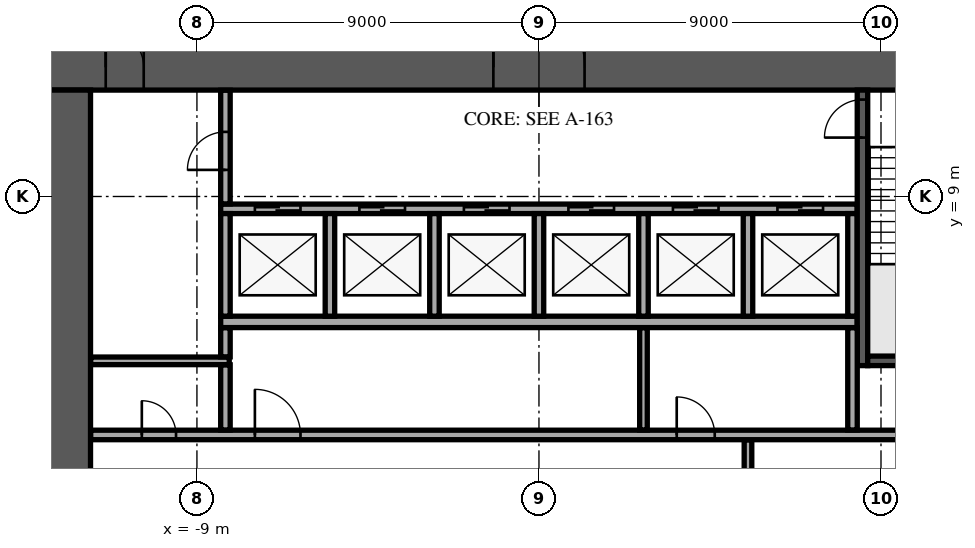
"""IFC4 building model, lengths in metres.
Left out: names, types, materials, properties, quantities, classifications, styles, units other than length and angle.
Written with IfcOpenShell. Run it as: python <this file> out.ifc"""

import sys

from ifc_helpers import new_model, si_unit, direction, frame, frame_2d, origin, place, context, subcontext, project, spatial, rectangle, extrude, element, fill, save


model = new_model("IFC4")
c1 = context("Model", 3, precision=1e-05, world=origin(), true_north=direction((0.0, 1.0)))
c2 = subcontext(c1, "Body", "Model", "MODEL_VIEW")
j1 = project(units=[si_unit("LENGTHUNIT", "METRE"), si_unit("PLANEANGLEUNIT", "RADIAN")], contexts=[c1])
p1 = place(None, origin())
s1 = spatial("IfcSite", under=j1, at=p1, CompositionType="ELEMENT")
p2 = place(p1, origin())
s2 = spatial("IfcBuilding", under=s1, at=p2, CompositionType="ELEMENT")
p3 = place(p2, origin())
s3 = spatial("IfcBuildingStorey", under=s2, at=p3, CompositionType="ELEMENT", Elevation=0.0)
p4 = place(p3, frame((-13.0, 12.4, 0.0), z_axis=(0.0, 0.0, 1.0), x_axis=(1.0, 0.0, 0.0)))
e1 = element("IfcWall", 1, at=p4, inside=s3, PredefinedType="SHEAR", context=c2, shape_type="SweptSolid", body=[
    extrude(rectangle(XDim=26.0, YDim=1.2, at=frame_2d((13.0, 0.0))), origin(), (0.0, 0.0, 1.0), 4.1),
])
p5 = place(p4, frame((11.8, 0.0, 0.0)))
e2 = element("IfcOpeningElement", 2, at=p5, cuts=e1, PredefinedType="OPENING", context=c2, shape_type="SweptSolid", body=[
    extrude(rectangle(XDim=2.4, YDim=2.4, at=frame_2d((1.2, 1.2))), frame((0.0, 0.61, 0.0), z_axis=(0.0, -1.0, 0.0), x_axis=(1.0, 0.0, 0.0)), (0.0, 0.0, 1.0), 1.22),
])
p6 = place(p4, frame((22.625, 0.0, 0.0)))
e3 = element("IfcOpeningElement", 3, at=p6, cuts=e1, PredefinedType="OPENING", context=c2, shape_type="SweptSolid", body=[
    extrude(rectangle(XDim=1.2, YDim=2.1, at=frame_2d((0.6, 1.05))), frame((0.0, 0.61, 0.0), z_axis=(0.0, -1.0, 0.0), x_axis=(1.0, 0.0, 0.0)), (0.0, 0.0, 1.0), 1.22),
])
p7 = place(p4, frame((1.6, 0.0, 0.0)))
e4 = element("IfcOpeningElement", 4, at=p7, cuts=e1, PredefinedType="OPENING", context=c2, shape_type="SweptSolid", body=[
    extrude(rectangle(XDim=1.0, YDim=2.1, at=frame_2d((0.5, 1.05))), frame((0.0, 0.61, 0.0), z_axis=(0.0, -1.0, 0.0), x_axis=(1.0, 0.0, 0.0)), (0.0, 0.0, 1.0), 1.22),
])
p8 = place(p3, frame((-12.4, -11.8, 0.0), z_axis=(0.0, 0.0, 1.0), x_axis=(0.0, 1.0, 0.0)))
e5 = element("IfcWall", 5, at=p8, inside=s3, PredefinedType="SHEAR", context=c2, shape_type="SweptSolid", body=[
    extrude(rectangle(XDim=23.6, YDim=1.2, at=frame_2d((11.8, 0.0))), origin(), (0.0, 0.0, 1.0), 4.1),
])
p9 = place(p8, frame((10.6, 0.0, 0.0)))
e6 = element("IfcOpeningElement", 6, at=p9, cuts=e5, PredefinedType="OPENING", context=c2, shape_type="SweptSolid", body=[
    extrude(rectangle(XDim=2.4, YDim=2.4, at=frame_2d((1.2, 1.2))), frame((0.0, 0.61, 0.0), z_axis=(0.0, -1.0, 0.0), x_axis=(1.0, 0.0, 0.0)), (0.0, 0.0, 1.0), 1.22),
])
p10 = place(p3, frame((-8.375, 5.7, 0.0), z_axis=(0.0, 0.0, 1.0), x_axis=(1.0, 0.0, 0.0)))
e7 = element("IfcWall", 7, at=p10, inside=s3, PredefinedType="SOLIDWALL", context=c2, shape_type="SweptSolid", body=[
    extrude(rectangle(XDim=16.75, YDim=0.3, at=frame_2d((8.375, 0.0))), origin(), (0.0, 0.0, 1.0), 4.1),
])
p11 = place(p3, frame((-8.375, 8.675, 0.0), z_axis=(0.0, 0.0, 1.0), x_axis=(1.0, 0.0, 0.0)))
e8 = element("IfcWall", 8, at=p11, inside=s3, PredefinedType="SOLIDWALL", context=c2, shape_type="SweptSolid", body=[
    extrude(rectangle(XDim=16.75, YDim=0.25, at=frame_2d((8.375, 0.0))), origin(), (0.0, 0.0, 1.0), 4.1),
])
p12 = place(p11, frame((0.9, 0.0, 0.0)))
e9 = element("IfcOpeningElement", 9, at=p12, cuts=e8, PredefinedType="OPENING", context=c2, shape_type="SweptSolid", body=[
    extrude(rectangle(XDim=1.2, YDim=2.1, at=frame_2d((0.6, 1.05))), frame((0.0, 0.135, 0.0), z_axis=(0.0, -1.0, 0.0), x_axis=(1.0, 0.0, 0.0)), (0.0, 0.0, 1.0), 0.27),
])
p13 = place(p11, frame((3.65, 0.0, 0.0)))
e10 = element("IfcOpeningElement", 10, at=p13, cuts=e8, PredefinedType="OPENING", context=c2, shape_type="SweptSolid", body=[
    extrude(rectangle(XDim=1.2, YDim=2.1, at=frame_2d((0.6, 1.05))), frame((0.0, 0.135, 0.0), z_axis=(0.0, -1.0, 0.0), x_axis=(1.0, 0.0, 0.0)), (0.0, 0.0, 1.0), 0.27),
])
p14 = place(p11, frame((6.4, 0.0, 0.0)))
e11 = element("IfcOpeningElement", 11, at=p14, cuts=e8, PredefinedType="OPENING", context=c2, shape_type="SweptSolid", body=[
    extrude(rectangle(XDim=1.2, YDim=2.1, at=frame_2d((0.6, 1.05))), frame((0.0, 0.135, 0.0), z_axis=(0.0, -1.0, 0.0), x_axis=(1.0, 0.0, 0.0)), (0.0, 0.0, 1.0), 0.27),
])
p15 = place(p11, frame((9.15, 0.0, 0.0)))
e12 = element("IfcOpeningElement", 12, at=p15, cuts=e8, PredefinedType="OPENING", context=c2, shape_type="SweptSolid", body=[
    extrude(rectangle(XDim=1.2, YDim=2.1, at=frame_2d((0.6, 1.05))), frame((0.0, 0.135, 0.0), z_axis=(0.0, -1.0, 0.0), x_axis=(1.0, 0.0, 0.0)), (0.0, 0.0, 1.0), 0.27),
])
p16 = place(p11, frame((11.9, 0.0, 0.0)))
e13 = element("IfcOpeningElement", 13, at=p16, cuts=e8, PredefinedType="OPENING", context=c2, shape_type="SweptSolid", body=[
    extrude(rectangle(XDim=1.2, YDim=2.1, at=frame_2d((0.6, 1.05))), frame((0.0, 0.135, 0.0), z_axis=(0.0, -1.0, 0.0), x_axis=(1.0, 0.0, 0.0)), (0.0, 0.0, 1.0), 0.27),
])
p17 = place(p11, frame((14.65, 0.0, 0.0)))
e14 = element("IfcOpeningElement", 14, at=p17, cuts=e8, PredefinedType="OPENING", context=c2, shape_type="SweptSolid", body=[
    extrude(rectangle(XDim=1.2, YDim=2.1, at=frame_2d((0.6, 1.05))), frame((0.0, 0.135, 0.0), z_axis=(0.0, -1.0, 0.0), x_axis=(1.0, 0.0, 0.0)), (0.0, 0.0, 1.0), 0.27),
])
for number, where, z_axis, x_axis in (
    (15, (-8.25, 5.85, 0.0), (0.0, 0.0, 1.0), (0.0, 1.0, 0.0)),
    (16, (-5.5, 5.85, 0.0), (0.0, 0.0, 1.0), (0.0, 1.0, 0.0)),
    (17, (-2.75, 5.85, 0.0), (0.0, 0.0, 1.0), (0.0, 1.0, 0.0)),
    (18, (0.0, 5.85, 0.0), (0.0, 0.0, 1.0), (0.0, 1.0, 0.0)),
    (19, (2.75, 5.85, 0.0), (0.0, 0.0, 1.0), (0.0, 1.0, 0.0)),
    (20, (5.5, 5.85, 0.0), (0.0, 0.0, 1.0), (0.0, 1.0, 0.0)),
    (21, (8.25, 5.85, 0.0), (0.0, 0.0, 1.0), (0.0, 1.0, 0.0)),
):
    element("IfcWall", number, at=place(p3, frame(where, z_axis=z_axis, x_axis=x_axis)), inside=s3, PredefinedType="SOLIDWALL", context=c2, shape_type="SweptSolid", body=[
        extrude(rectangle(XDim=2.7, YDim=0.25, at=frame_2d((1.35, 0.0))), origin(), (0.0, 0.0, 1.0), 4.1),
    ])
p18 = place(p3, frame((8.512, 4.55, 0.0), z_axis=(0.0, 0.0, 1.0), x_axis=(0.0, 1.0, 0.0)))
e22 = element("IfcWall", 22, at=p18, inside=s3, PredefinedType="SOLIDWALL", context=c2, shape_type="SweptSolid", body=[
    extrude(rectangle(XDim=7.25, YDim=0.275, at=frame_2d((3.625, 0.0))), origin(), (0.0, 0.0, 1.0), 4.1),
])
p19 = place(p18, frame((6.0, 0.0, 0.0)))
e23 = element("IfcOpeningElement", 23, at=p19, cuts=e22, PredefinedType="OPENING", context=c2, shape_type="SweptSolid", body=[
    extrude(rectangle(XDim=1.0, YDim=2.1, at=frame_2d((0.5, 1.05))), frame((0.0, 0.147, 0.0), z_axis=(0.0, -1.0, 0.0), x_axis=(1.0, 0.0, 0.0)), (0.0, 0.0, 1.0), 0.295),
])
p20 = place(p3, frame((8.65, 4.675, 0.0), z_axis=(0.0, 0.0, 1.0), x_axis=(1.0, 0.0, 0.0)))
e24 = element("IfcWall", 24, at=p20, inside=s3, PredefinedType="SOLIDWALL", context=c2, shape_type="SweptSolid", body=[
    extrude(rectangle(XDim=3.15, YDim=0.25, at=frame_2d((1.575, 0.0))), origin(), (0.0, 0.0, 1.0), 4.1),
])
p21 = place(p3, frame((5.5, -2.595, 0.0), z_axis=(0.0, 0.0, 1.0), x_axis=(0.0, 1.0, 0.0)))
e25 = element("IfcWall", 25, at=p21, inside=s3, PredefinedType="PARTITIONING", context=c2, shape_type="SweptSolid", body=[
    extrude(rectangle(XDim=5.19, YDim=0.2, at=frame_2d((2.595, 0.0))), origin(), (0.0, 0.0, 1.0), 4.1),
])
p22 = place(p21, frame((1.395, 0.0, 0.0)))
e26 = element("IfcOpeningElement", 26, at=p22, cuts=e25, PredefinedType="OPENING", context=c2, shape_type="SweptSolid", body=[
    extrude(rectangle(XDim=2.4, YDim=2.4, at=frame_2d((1.2, 1.2))), frame((0.0, 0.11, 0.0), z_axis=(0.0, -1.0, 0.0), x_axis=(1.0, 0.0, 0.0)), (0.0, 0.0, 1.0), 0.22),
])
p23 = place(p3, frame((-11.795, 2.725, 0.0), z_axis=(0.0, 0.0, 1.0), x_axis=(1.0, 0.0, 0.0)))
e27 = element("IfcWall", 27, at=p23, inside=s3, PredefinedType="PARTITIONING", context=c2, shape_type="SweptSolid", body=[
    extrude(rectangle(XDim=23.59, YDim=0.25, at=frame_2d((11.795, 0.0))), origin(), (0.0, 0.0, 1.0), 4.1),
])
p24 = place(p23, frame((21.345, 0.0, 0.0)))
e28 = element("IfcOpeningElement", 28, at=p24, cuts=e27, PredefinedType="OPENING", context=c2, shape_type="SweptSolid", body=[
    extrude(rectangle(XDim=0.9, YDim=2.1, at=frame_2d((0.45, 1.05))), frame((0.0, 0.135, 0.0), z_axis=(0.0, -1.0, 0.0), x_axis=(1.0, 0.0, 0.0)), (0.0, 0.0, 1.0), 0.27),
])
p25 = place(p23, frame((1.345, 0.0, 0.0)))
e29 = element("IfcOpeningElement", 29, at=p25, cuts=e27, PredefinedType="OPENING", context=c2, shape_type="SweptSolid", body=[
    extrude(rectangle(XDim=0.9, YDim=2.1, at=frame_2d((0.45, 1.05))), frame((0.0, 0.135, 0.0), z_axis=(0.0, -1.0, 0.0), x_axis=(1.0, 0.0, 0.0)), (0.0, 0.0, 1.0), 0.27),
])
p26 = place(p23, frame((4.32, 0.0, 0.0)))
e30 = element("IfcOpeningElement", 30, at=p26, cuts=e27, PredefinedType="OPENING", context=c2, shape_type="SweptSolid", body=[
    extrude(rectangle(XDim=1.2, YDim=2.1, at=frame_2d((0.6, 1.05))), frame((0.0, 0.135, 0.0), z_axis=(0.0, -1.0, 0.0), x_axis=(1.0, 0.0, 0.0)), (0.0, 0.0, 1.0), 0.27),
])
p27 = place(p23, frame((15.42, 0.0, 0.0)))
e31 = element("IfcOpeningElement", 31, at=p27, cuts=e27, PredefinedType="OPENING", context=c2, shape_type="SweptSolid", body=[
    extrude(rectangle(XDim=1.0, YDim=2.1, at=frame_2d((0.5, 1.05))), frame((0.0, 0.135, 0.0), z_axis=(0.0, -1.0, 0.0), x_axis=(1.0, 0.0, 0.0)), (0.0, 0.0, 1.0), 0.27),
])
p28 = place(p3, frame((-8.25, 2.855, 0.0), z_axis=(0.0, 0.0, 1.0), x_axis=(0.0, 1.0, 0.0)))
e32 = element("IfcWall", 32, at=p28, inside=s3, PredefinedType="PARTITIONING", context=c2, shape_type="SweptSolid", body=[
    extrude(rectangle(XDim=1.715, YDim=0.25, at=frame_2d((0.857, 0.0))), origin(), (0.0, 0.0, 1.0), 4.1),
])
p29 = place(p3, frame((2.75, 2.855, 0.0), z_axis=(0.0, 0.0, 1.0), x_axis=(0.0, 1.0, 0.0)))
e33 = element("IfcWall", 33, at=p29, inside=s3, PredefinedType="PARTITIONING", context=c2, shape_type="SweptSolid", body=[
    extrude(rectangle(XDim=2.69, YDim=0.2, at=frame_2d((1.345, 0.0))), origin(), (0.0, 0.0, 1.0), 4.1),
])
p30 = place(p3, frame((8.25, 2.855, 0.0), z_axis=(0.0, 0.0, 1.0), x_axis=(0.0, 1.0, 0.0)))
e34 = element("IfcWall", 34, at=p30, inside=s3, PredefinedType="PARTITIONING", context=c2, shape_type="SweptSolid", body=[
    extrude(rectangle(XDim=2.69, YDim=0.25, at=frame_2d((1.345, 0.0))), origin(), (0.0, 0.0, 1.0), 4.1),
])
p31 = place(p3, frame((-11.795, 4.675, 0.0), z_axis=(0.0, 0.0, 1.0), x_axis=(1.0, 0.0, 0.0)))
e35 = element("IfcWall", 35, at=p31, inside=s3, PredefinedType="PARTITIONING", context=c2, shape_type="SweptSolid", body=[
    extrude(rectangle(XDim=3.645, YDim=0.2, at=frame_2d((1.823, 0.0))), origin(), (0.0, 0.0, 1.0), 4.1),
])
p32 = place(p3, frame((-8.25, 4.78, 0.0), z_axis=(0.0, 0.0, 1.0), x_axis=(0.0, 1.0, 0.0)))
e36 = element("IfcWall", 36, at=p32, inside=s3, PredefinedType="PARTITIONING", context=c2, shape_type="SweptSolid", body=[
    extrude(rectangle(XDim=0.765, YDim=0.25, at=frame_2d((0.382, 0.0))), origin(), (0.0, 0.0, 1.0), 4.1),
])
p33 = place(p3, frame((-8.25, 8.805, 0.0), z_axis=(0.0, 0.0, 1.0), x_axis=(0.0, 1.0, 0.0)))
e37 = element("IfcWall", 37, at=p33, inside=s3, PredefinedType="PARTITIONING", context=c2, shape_type="SweptSolid", body=[
    extrude(rectangle(XDim=2.99, YDim=0.25, at=frame_2d((1.495, 0.0))), origin(), (0.0, 0.0, 1.0), 4.1),
])
p34 = place(p33, frame((0.895, 0.0, 0.0)))
e38 = element("IfcOpeningElement", 38, at=p34, cuts=e37, PredefinedType="OPENING", context=c2, shape_type="SweptSolid", body=[
    extrude(rectangle(XDim=1.0, YDim=2.1, at=frame_2d((0.5, 1.05))), frame((0.0, 0.135, 0.0), z_axis=(0.0, -1.0, 0.0), x_axis=(1.0, 0.0, 0.0)), (0.0, 0.0, 1.0), 0.27),
])
p35 = place(p5, origin())
e39 = element("IfcDoor", 39, at=p35, inside=s3, OperationType="SINGLE_SWING_LEFT", PredefinedType="DOOR", context=c2, shape_type="SweptSolid", body=[
    extrude(rectangle(XDim=2.4, YDim=2.4, at=frame_2d((1.2, 1.2))), frame((0.0, 0.025, 0.0), z_axis=(0.0, -1.0, 0.0), x_axis=(1.0, 0.0, 0.0)), (0.0, 0.0, 1.0), 0.05),
])
fill(e2, e39)
p36 = place(p7, origin())
e40 = element("IfcDoor", 40, at=p36, inside=s3, OperationType="SINGLE_SWING_LEFT", PredefinedType="DOOR", context=c2, shape_type="SweptSolid", body=[
    extrude(rectangle(XDim=1.0, YDim=2.1, at=frame_2d((0.5, 1.05))), frame((0.0, 0.025, 0.0), z_axis=(0.0, -1.0, 0.0), x_axis=(1.0, 0.0, 0.0)), (0.0, 0.0, 1.0), 0.05),
])
fill(e4, e40)
p37 = place(p12, origin())
e41 = element("IfcDoor", 41, at=p37, inside=s3, OperationType="DOUBLE_DOOR_SLIDING", PredefinedType="DOOR", context=c2, shape_type="SweptSolid", body=[
    extrude(rectangle(XDim=1.2, YDim=2.1, at=frame_2d((0.6, 1.05))), frame((0.0, 0.025, 0.0), z_axis=(0.0, -1.0, 0.0), x_axis=(1.0, 0.0, 0.0)), (0.0, 0.0, 1.0), 0.05),
])
fill(e9, e41)
p38 = place(p13, origin())
e42 = element("IfcDoor", 42, at=p38, inside=s3, OperationType="DOUBLE_DOOR_SLIDING", PredefinedType="DOOR", context=c2, shape_type="SweptSolid", body=[
    extrude(rectangle(XDim=1.2, YDim=2.1, at=frame_2d((0.6, 1.05))), frame((0.0, 0.025, 0.0), z_axis=(0.0, -1.0, 0.0), x_axis=(1.0, 0.0, 0.0)), (0.0, 0.0, 1.0), 0.05),
])
fill(e10, e42)
p39 = place(p14, origin())
e43 = element("IfcDoor", 43, at=p39, inside=s3, OperationType="DOUBLE_DOOR_SLIDING", PredefinedType="DOOR", context=c2, shape_type="SweptSolid", body=[
    extrude(rectangle(XDim=1.2, YDim=2.1, at=frame_2d((0.6, 1.05))), frame((0.0, 0.025, 0.0), z_axis=(0.0, -1.0, 0.0), x_axis=(1.0, 0.0, 0.0)), (0.0, 0.0, 1.0), 0.05),
])
fill(e11, e43)
p40 = place(p15, origin())
e44 = element("IfcDoor", 44, at=p40, inside=s3, OperationType="DOUBLE_DOOR_SLIDING", PredefinedType="DOOR", context=c2, shape_type="SweptSolid", body=[
    extrude(rectangle(XDim=1.2, YDim=2.1, at=frame_2d((0.6, 1.05))), frame((0.0, 0.025, 0.0), z_axis=(0.0, -1.0, 0.0), x_axis=(1.0, 0.0, 0.0)), (0.0, 0.0, 1.0), 0.05),
])
fill(e12, e44)
p41 = place(p16, origin())
e45 = element("IfcDoor", 45, at=p41, inside=s3, OperationType="DOUBLE_DOOR_SLIDING", PredefinedType="DOOR", context=c2, shape_type="SweptSolid", body=[
    extrude(rectangle(XDim=1.2, YDim=2.1, at=frame_2d((0.6, 1.05))), frame((0.0, 0.025, 0.0), z_axis=(0.0, -1.0, 0.0), x_axis=(1.0, 0.0, 0.0)), (0.0, 0.0, 1.0), 0.05),
])
fill(e13, e45)
p42 = place(p17, origin())
e46 = element("IfcDoor", 46, at=p42, inside=s3, OperationType="DOUBLE_DOOR_SLIDING", PredefinedType="DOOR", context=c2, shape_type="SweptSolid", body=[
    extrude(rectangle(XDim=1.2, YDim=2.1, at=frame_2d((0.6, 1.05))), frame((0.0, 0.025, 0.0), z_axis=(0.0, -1.0, 0.0), x_axis=(1.0, 0.0, 0.0)), (0.0, 0.0, 1.0), 0.05),
])
fill(e14, e46)
p43 = place(p19, origin())
e47 = element("IfcDoor", 47, at=p43, inside=s3, OperationType="SINGLE_SWING_LEFT", PredefinedType="DOOR", context=c2, shape_type="SweptSolid", body=[
    extrude(rectangle(XDim=1.0, YDim=2.1, at=frame_2d((0.5, 1.05))), frame((0.0, 0.025, 0.0), z_axis=(0.0, -1.0, 0.0), x_axis=(1.0, 0.0, 0.0)), (0.0, 0.0, 1.0), 0.05),
])
fill(e23, e47)
p44 = place(p25, origin())
e48 = element("IfcDoor", 48, at=p44, inside=s3, OperationType="SINGLE_SWING_LEFT", PredefinedType="DOOR", context=c2, shape_type="SweptSolid", body=[
    extrude(rectangle(XDim=0.9, YDim=2.1, at=frame_2d((0.45, 1.05))), frame((0.0, 0.025, 0.0), z_axis=(0.0, -1.0, 0.0), x_axis=(1.0, 0.0, 0.0)), (0.0, 0.0, 1.0), 0.05),
])
fill(e29, e48)
p45 = place(p34, origin())
e49 = element("IfcDoor", 49, at=p45, inside=s3, OperationType="SINGLE_SWING_LEFT", PredefinedType="DOOR", context=c2, shape_type="SweptSolid", body=[
    extrude(rectangle(XDim=1.0, YDim=2.1, at=frame_2d((0.5, 1.05))), frame((0.0, 0.025, 0.0), z_axis=(0.0, -1.0, 0.0), x_axis=(1.0, 0.0, 0.0)), (0.0, 0.0, 1.0), 0.05),
])
fill(e38, e49)
p46 = place(p26, origin())
e50 = element("IfcDoor", 50, at=p46, inside=s3, OperationType="SINGLE_SWING_LEFT", PredefinedType="DOOR", context=c2, shape_type="SweptSolid", body=[
    extrude(rectangle(XDim=1.2, YDim=2.1, at=frame_2d((0.6, 1.05))), frame((0.0, 0.025, 0.0), z_axis=(0.0, -1.0, 0.0), x_axis=(1.0, 0.0, 0.0)), (0.0, 0.0, 1.0), 0.05),
])
fill(e30, e50)
p47 = place(p27, origin())
e51 = element("IfcDoor", 51, at=p47, inside=s3, OperationType="SINGLE_SWING_LEFT", PredefinedType="DOOR", context=c2, shape_type="SweptSolid", body=[
    extrude(rectangle(XDim=1.0, YDim=2.1, at=frame_2d((0.5, 1.05))), frame((0.0, 0.025, 0.0), z_axis=(0.0, -1.0, 0.0), x_axis=(1.0, 0.0, 0.0)), (0.0, 0.0, 1.0), 0.05),
])
fill(e31, e51)
save(model, sys.argv[1])
